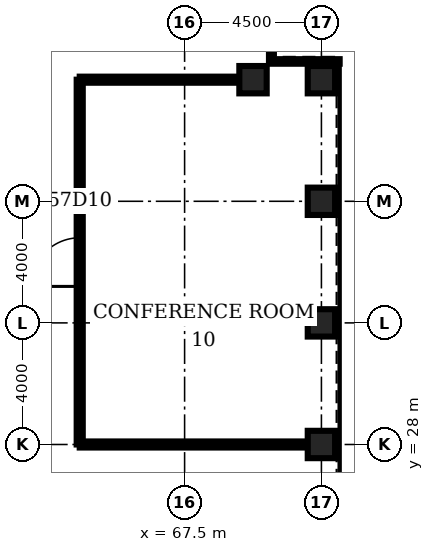
"""IFC4 building model, lengths in metres.
Left out: names, types, materials, properties, quantities, classifications, styles, units other than length and angle.
Written with IfcOpenShell. Run it as: python <this file> out.ifc"""

import sys

from ifc_helpers import new_model, si_unit, direction, frame, frame_2d, origin, origin_2d, place, context, subcontext, project, spatial, rectangle, hollow_rectangle, extrude, element, fill, save


model = new_model("IFC4")
c1 = context("Model", 3, precision=1e-05, world=origin(), true_north=direction((0.0, 1.0)))
c2 = subcontext(c1, "Body", "Model", "MODEL_VIEW")
j1 = project(units=[si_unit("LENGTHUNIT", "METRE"), si_unit("PLANEANGLEUNIT", "RADIAN")], contexts=[c1])
p1 = place(None, origin())
s1 = spatial("IfcSite", under=j1, at=p1, CompositionType="ELEMENT")
p2 = place(p1, origin())
s2 = spatial("IfcBuilding", under=s1, at=p2, CompositionType="ELEMENT")
p3 = place(p2, frame((0.0, 0.0, 253.0)))
s3 = spatial("IfcBuildingStorey", under=s2, at=p3, CompositionType="ELEMENT", Elevation=253.0)
for number, where, z_axis, x_axis in (
    (1, (72.0, 28.0, 0.0), (0.0, 0.0, 1.0), (1.0, 0.0, 0.0)),
    (2, (72.0, 32.0, 0.0), (0.0, 0.0, 1.0), (1.0, 0.0, 0.0)),
    (3, (72.0, 36.0, 0.0), (0.0, 0.0, 1.0), (1.0, 0.0, 0.0)),
    (4, (72.0, 40.0, 0.0), (0.0, 0.0, 1.0), (1.0, 0.0, 0.0)),
    (5, (69.75, 40.0, 0.0), (0.0, 0.0, 1.0), (1.0, 0.0, 0.0)),
):
    element("IfcColumn", number, at=place(p3, frame(where, z_axis=z_axis, x_axis=x_axis)), inside=s3, PredefinedType="COLUMN", context=c2, shape_type="SweptSolid", body=[
        extrude(hollow_rectangle(XDim=0.9, YDim=0.9, WallThickness=0.07, at=origin_2d()), origin(), (0.0, 0.0, 1.0), 4.2),
    ])
p4 = place(p3, frame((64.05, 28.0, 0.0), z_axis=(0.0, 0.0, 1.0), x_axis=(1.0, 0.0, 0.0)))
e6 = element("IfcWall", 6, at=p4, inside=s3, PredefinedType="PARTITIONING", context=c2, shape_type="SweptSolid", body=[
    extrude(rectangle(XDim=7.5, YDim=0.2, at=frame_2d((3.75, 0.0))), origin(), (0.0, 0.0, 1.0), 3.0),
])
p5 = place(p3, frame((64.05, 40.0, 0.0), z_axis=(0.0, 0.0, 1.0), x_axis=(1.0, 0.0, 0.0)))
e7 = element("IfcWall", 7, at=p5, inside=s3, PredefinedType="PARTITIONING", context=c2, shape_type="SweptSolid", body=[
    extrude(rectangle(XDim=5.25, YDim=0.2, at=frame_2d((2.625, 0.0))), origin(), (0.0, 0.0, 1.0), 3.0),
])
p6 = place(p3, frame((64.05, 28.0, 0.0), z_axis=(0.0, 0.0, 1.0), x_axis=(0.0, 1.0, 0.0)))
e8 = element("IfcWall", 8, at=p6, inside=s3, PredefinedType="PARTITIONING", context=c2, shape_type="SweptSolid", body=[
    extrude(rectangle(XDim=12.0, YDim=0.2, at=frame_2d((6.0, 0.0))), origin(), (0.0, 0.0, 1.0), 3.0),
])
p7 = place(p6, frame((5.2, 0.0, 0.0)))
e9 = element("IfcOpeningElement", 9, at=p7, cuts=e8, PredefinedType="OPENING", context=c2, shape_type="SweptSolid", body=[
    extrude(rectangle(XDim=1.6, YDim=2.1, at=frame_2d((0.8, 1.05))), frame((0.0, 0.11, 0.0), z_axis=(0.0, -1.0, 0.0), x_axis=(1.0, 0.0, 0.0)), (0.0, 0.0, 1.0), 0.22),
])
p8 = place(p3, frame((72.6, 40.6, 0.0), z_axis=(0.0, 0.0, 1.0), x_axis=(-1.0, 0.0, 0.0)))
e10 = element("IfcWall", 10, at=p8, inside=s3, PredefinedType="ELEMENTEDWALL", context=c2, shape_type="SweptSolid", body=[
    extrude(rectangle(XDim=2.25, YDim=0.15, at=frame_2d((1.125, 0.0))), origin(), (0.0, 0.0, 1.0), 4.04),
])
p9 = place(p3, frame((70.35, 40.6, 0.0), z_axis=(0.0, 0.0, 1.0), x_axis=(0.0, 1.0, 0.0)))
e11 = element("IfcWall", 11, at=p9, inside=s3, PredefinedType="ELEMENTEDWALL", context=c2, shape_type="SweptSolid", body=[
    extrude(rectangle(XDim=2.0, YDim=0.15, at=frame_2d((1.0, 0.0))), origin(), (0.0, 0.0, 1.0), 4.04),
])
p10 = place(p7, origin())
e12 = element("IfcDoor", 12, at=p10, inside=s3, OperationType="SINGLE_SWING_LEFT", PredefinedType="DOOR", context=c2, shape_type="SweptSolid", body=[
    extrude(rectangle(XDim=1.6, YDim=2.1, at=frame_2d((0.8, 1.05))), frame((0.0, 0.025, 0.0), z_axis=(0.0, -1.0, 0.0), x_axis=(1.0, 0.0, 0.0)), (0.0, 0.0, 1.0), 0.05),
])
fill(e9, e12)
save(model, sys.argv[1])
